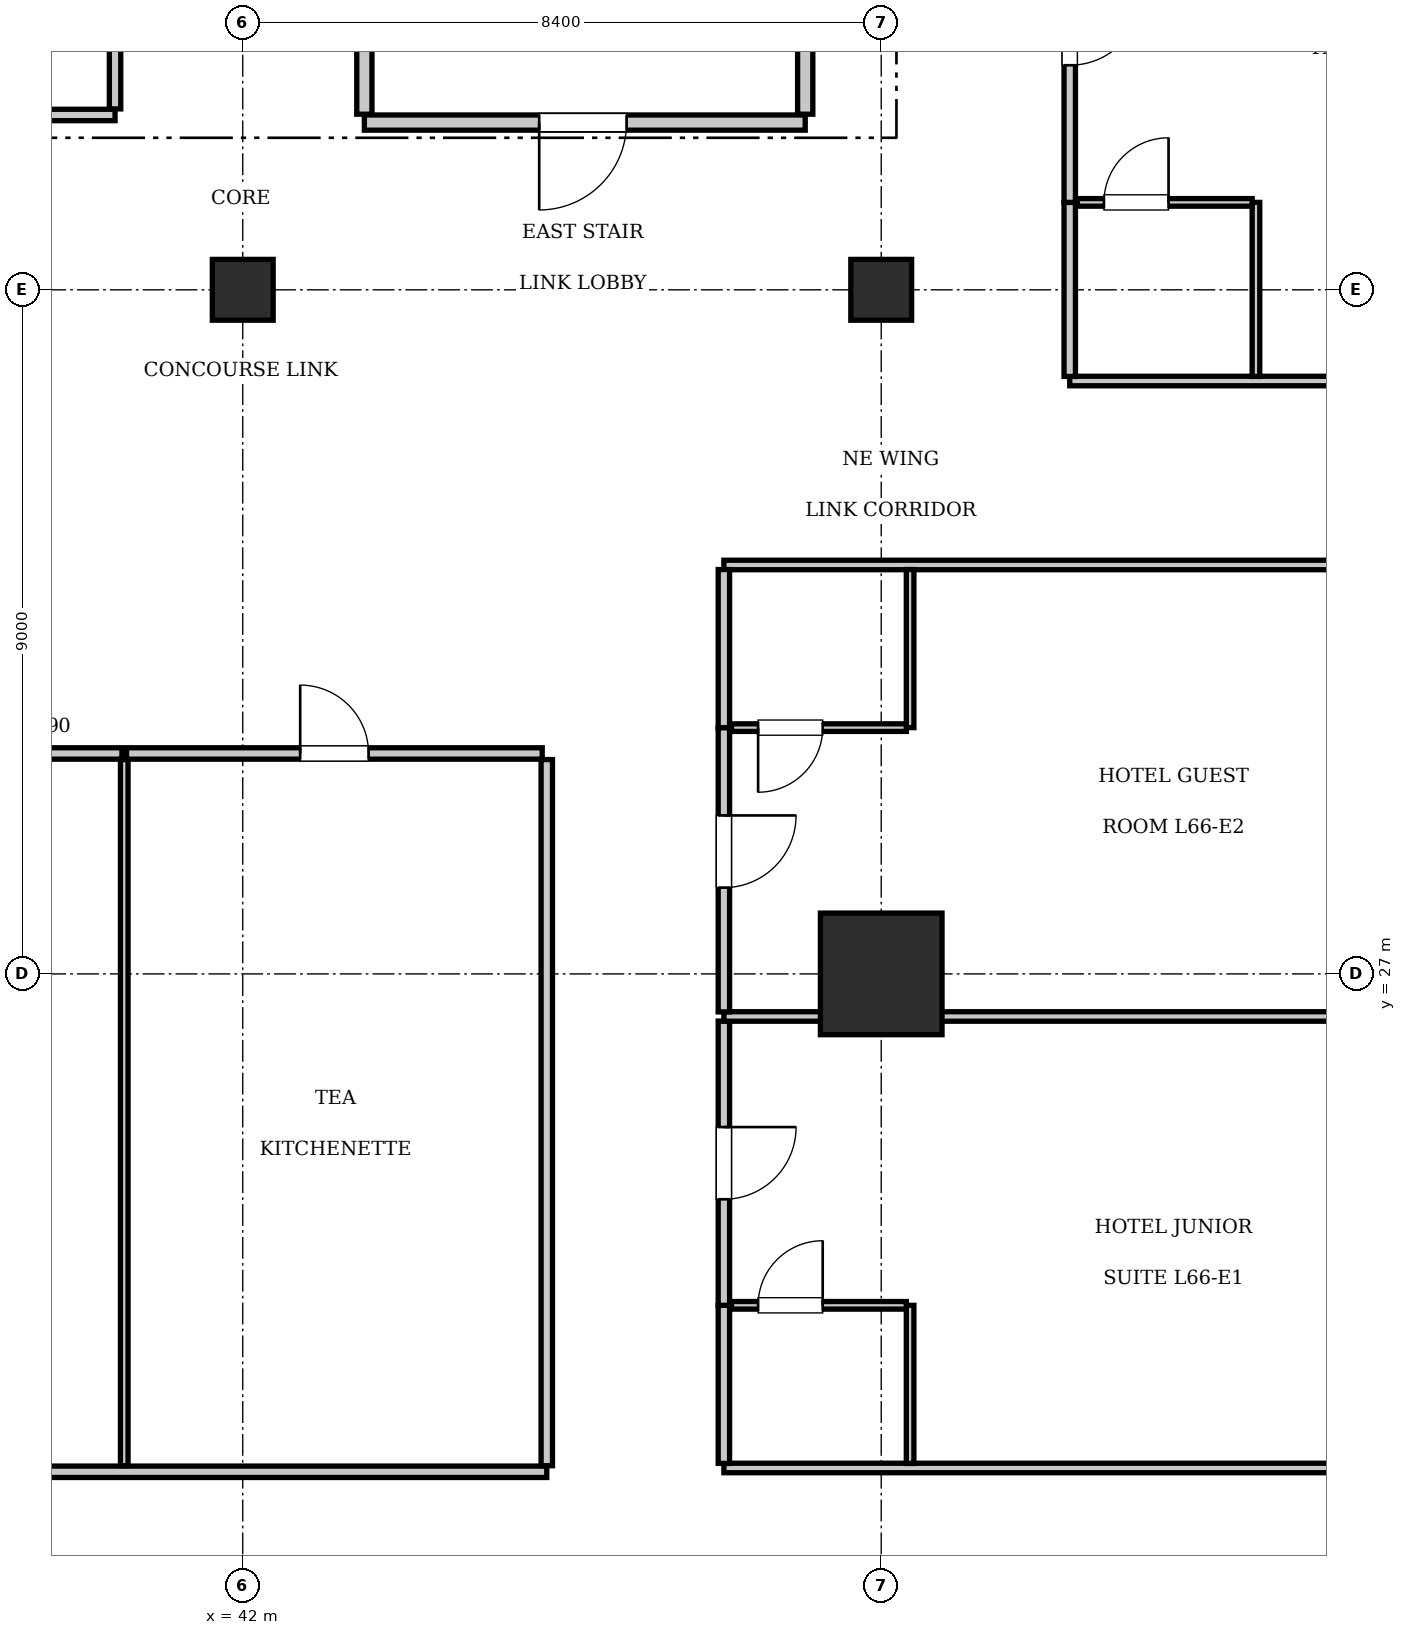
"""IFC4 building model, lengths in metres.
Left out: names, types, materials, properties, quantities, classifications, styles, units other than length and angle.
Written with IfcOpenShell. Run it as: python <this file> out.ifc"""

import sys

from ifc_helpers import new_model, si_unit, direction, frame, frame_2d, origin, origin_2d, place, context, subcontext, project, spatial, rectangle, extrude, element, fill, save


model = new_model("IFC4")
c1 = context("Model", 3, precision=1e-05, world=origin(), true_north=direction((0.0, 1.0)))
c2 = subcontext(c1, "Body", "Model", "MODEL_VIEW")
j1 = project(units=[si_unit("LENGTHUNIT", "METRE"), si_unit("PLANEANGLEUNIT", "RADIAN")], contexts=[c1])
p1 = place(None, origin())
s1 = spatial("IfcSite", under=j1, at=p1, CompositionType="ELEMENT")
p2 = place(p1, origin())
s2 = spatial("IfcBuilding", under=s1, at=p2, CompositionType="ELEMENT")
p3 = place(p2, frame((0.0, 0.0, 270.2)))
s3 = spatial("IfcBuildingStorey", under=s2, at=p3, CompositionType="ELEMENT", Elevation=270.2)
p4 = place(p3, frame((50.4, 27.0, 0.0), z_axis=(0.0, 0.0, 1.0), x_axis=(1.0, 0.0, 0.0)))
e1 = element("IfcColumn", 1, at=p4, inside=s3, PredefinedType="COLUMN", context=c2, shape_type="SweptSolid", body=[
    extrude(rectangle(XDim=1.6, YDim=1.6, at=origin_2d()), origin(), (0.0, 0.0, 1.0), 3.85),
])
for number, where, z_axis, x_axis in (
    (2, (42.0, 36.0, 0.0), (0.0, 0.0, 1.0), (1.0, 0.0, 0.0)),
    (3, (50.4, 36.0, 0.0), (0.0, 0.0, 1.0), (1.0, 0.0, 0.0)),
):
    element("IfcColumn", number, at=place(p3, frame(where, z_axis=z_axis, x_axis=x_axis)), inside=s3, PredefinedType="COLUMN", context=c2, shape_type="SweptSolid", body=[
        extrude(rectangle(XDim=0.8, YDim=0.8, at=origin_2d()), origin(), (0.0, 0.0, 1.0), 3.85),
    ])
p5 = place(p3, frame((43.6, 38.2, 0.0), z_axis=(0.0, 0.0, 1.0), x_axis=(1.0, 0.0, 0.0)))
e4 = element("IfcWall", 4, at=p5, inside=s3, PredefinedType="PARTITIONING", context=c2, shape_type="SweptSolid", body=[
    extrude(rectangle(XDim=5.8, YDim=0.2, at=frame_2d((2.9, 0.0))), origin(), (0.0, 0.0, 1.0), 3.61),
])
p6 = place(p5, frame((2.3, 0.0, 0.0)))
e5 = element("IfcOpeningElement", 5, at=p6, cuts=e4, PredefinedType="OPENING", context=c2, shape_type="SweptSolid", body=[
    extrude(rectangle(XDim=1.15, YDim=2.15, at=frame_2d((0.575, 1.075))), frame((0.0, 0.11, 0.0), z_axis=(0.0, -1.0, 0.0), x_axis=(1.0, 0.0, 0.0)), (0.0, 0.0, 1.0), 0.22),
])
for number, where, z_axis, x_axis in (
    (6, (43.6, 38.31, 0.0), (0.0, 0.0, 1.0), (0.0, 1.0, 0.0)),
    (7, (49.4, 38.31, 0.0), (0.0, 0.0, 1.0), (0.0, 1.0, 0.0)),
):
    element("IfcWall", number, at=place(p3, frame(where, z_axis=z_axis, x_axis=x_axis)), inside=s3, PredefinedType="PARTITIONING", context=c2, shape_type="SweptSolid", body=[
        extrude(rectangle(XDim=3.07, YDim=0.2, at=frame_2d((1.535, 0.0))), origin(), (0.0, 0.0, 1.0), 3.61),
    ])
p7 = place(p3, frame((34.4, 38.3, 0.0), z_axis=(0.0, 0.0, 1.0), x_axis=(1.0, 0.0, 0.0)))
e8 = element("IfcWall", 8, at=p7, inside=s3, PredefinedType="PARTITIONING", context=c2, shape_type="SweptSolid", body=[
    extrude(rectangle(XDim=5.92, YDim=0.15, at=frame_2d((2.96, 0.0))), origin(), (0.0, 0.0, 1.0), 3.61),
])
p8 = place(p7, frame((2.4, 0.0, 0.0)))
e9 = element("IfcOpeningElement", 9, at=p8, cuts=e8, PredefinedType="OPENING", context=c2, shape_type="SweptSolid", body=[
    extrude(rectangle(XDim=0.9, YDim=2.1, at=frame_2d((0.45, 1.05))), frame((0.0, 0.085, 0.0), z_axis=(0.0, -1.0, 0.0), x_axis=(1.0, 0.0, 0.0)), (0.0, 0.0, 1.0), 0.17),
])
p9 = place(p3, frame((40.32, 38.38, 0.0), z_axis=(0.0, 0.0, 1.0), x_axis=(0.0, 1.0, 0.0)))
e10 = element("IfcWall", 10, at=p9, inside=s3, PredefinedType="PARTITIONING", context=c2, shape_type="SweptSolid", body=[
    extrude(rectangle(XDim=2.84, YDim=0.15, at=frame_2d((1.42, 0.0))), origin(), (0.0, 0.0, 1.0), 3.61),
])
p10 = place(p3, frame((29.65, 20.45, 0.0), z_axis=(0.0, 0.0, 1.0), x_axis=(1.0, 0.0, 0.0)))
e11 = element("IfcWall", 11, at=p10, inside=s3, PredefinedType="PARTITIONING", context=c2, shape_type="SweptSolid", body=[
    extrude(rectangle(XDim=16.35, YDim=0.15, at=frame_2d((8.175, 0.0))), origin(), (0.0, 0.0, 1.0), 3.61),
])
p11 = place(p3, frame((46.0, 20.53, 0.0), z_axis=(0.0, 0.0, 1.0), x_axis=(0.0, 1.0, 0.0)))
e12 = element("IfcWall", 12, at=p11, inside=s3, PredefinedType="PARTITIONING", context=c2, shape_type="SweptSolid", body=[
    extrude(rectangle(XDim=9.29, YDim=0.15, at=frame_2d((4.645, 0.0))), origin(), (0.0, 0.0, 1.0), 3.61),
])
p12 = place(p3, frame((35.893, 29.9, 0.0), z_axis=(0.0, 0.0, 1.0), x_axis=(1.0, 0.0, 0.0)))
e13 = element("IfcWall", 13, at=p12, inside=s3, PredefinedType="PARTITIONING", context=c2, shape_type="SweptSolid", body=[
    extrude(rectangle(XDim=4.518, YDim=0.15, at=frame_2d((2.259, 0.0))), origin(), (0.0, 0.0, 1.0), 3.61),
])
p13 = place(p12, frame((1.809, 0.0, 0.0)))
e14 = element("IfcOpeningElement", 14, at=p13, cuts=e13, PredefinedType="OPENING", context=c2, shape_type="SweptSolid", body=[
    extrude(rectangle(XDim=0.9, YDim=2.1, at=frame_2d((0.45, 1.05))), frame((0.0, 0.085, 0.0), z_axis=(0.0, -1.0, 0.0), x_axis=(1.0, 0.0, 0.0)), (0.0, 0.0, 1.0), 0.17),
])
p14 = place(p3, frame((40.441, 20.53, 0.0), z_axis=(0.0, 0.0, 1.0), x_axis=(0.0, 1.0, 0.0)))
e15 = element("IfcWall", 15, at=p14, inside=s3, PredefinedType="PARTITIONING", context=c2, shape_type="SweptSolid", body=[
    extrude(rectangle(XDim=9.29, YDim=0.1, at=frame_2d((4.645, 0.0))), origin(), (0.0, 0.0, 1.0), 3.61),
])
p15 = place(p3, frame((40.471, 29.9, 0.0), z_axis=(0.0, 0.0, 1.0), x_axis=(1.0, 0.0, 0.0)))
e16 = element("IfcWall", 16, at=p15, inside=s3, PredefinedType="PARTITIONING", context=c2, shape_type="SweptSolid", body=[
    extrude(rectangle(XDim=5.469, YDim=0.15, at=frame_2d((2.734, 0.0))), origin(), (0.0, 0.0, 1.0), 3.61),
])
p16 = place(p15, frame((2.284, 0.0, 0.0)))
e17 = element("IfcOpeningElement", 17, at=p16, cuts=e16, PredefinedType="OPENING", context=c2, shape_type="SweptSolid", body=[
    extrude(rectangle(XDim=0.9, YDim=2.1, at=frame_2d((0.45, 1.05))), frame((0.0, 0.085, 0.0), z_axis=(0.0, -1.0, 0.0), x_axis=(1.0, 0.0, 0.0)), (0.0, 0.0, 1.0), 0.17),
])
for number, where, z_axis, x_axis in (
    (18, (48.33, 20.5, 0.0), (0.0, 0.0, 1.0), (1.0, 0.0, 0.0)),
    (19, (48.33, 32.38, 0.0), (0.0, 0.0, 1.0), (1.0, 0.0, 0.0)),
):
    element("IfcWall", number, at=place(p3, frame(where, z_axis=z_axis, x_axis=x_axis)), inside=s3, PredefinedType="PARTITIONING", context=c2, shape_type="SweptSolid", body=[
        extrude(rectangle(XDim=11.77, YDim=0.125, at=frame_2d((5.885, 0.0))), origin(), (0.0, 0.0, 1.0), 3.61),
    ])
p17 = place(p3, frame((48.33, 20.56, 0.0), z_axis=(0.0, 0.0, 1.0), x_axis=(0.0, 1.0, 0.0)))
e20 = element("IfcWall", 20, at=p17, inside=s3, PredefinedType="PARTITIONING", context=c2, shape_type="SweptSolid", body=[
    extrude(rectangle(XDim=2.08, YDim=0.15, at=frame_2d((1.04, 0.0))), origin(), (0.0, 0.0, 1.0), 3.61),
])
p18 = place(p3, frame((48.33, 22.64, 0.0), z_axis=(0.0, 0.0, 1.0), x_axis=(0.0, 1.0, 0.0)))
e21 = element("IfcWall", 21, at=p18, inside=s3, PredefinedType="PARTITIONING", context=c2, shape_type="SweptSolid", body=[
    extrude(rectangle(XDim=3.74, YDim=0.15, at=frame_2d((1.87, 0.0))), origin(), (0.0, 0.0, 1.0), 3.61),
])
p19 = place(p18, frame((1.395, 0.0, 0.0)))
e22 = element("IfcOpeningElement", 22, at=p19, cuts=e21, PredefinedType="OPENING", context=c2, shape_type="SweptSolid", body=[
    extrude(rectangle(XDim=0.95, YDim=2.15, at=frame_2d((0.475, 1.075))), frame((0.0, 0.085, 0.0), z_axis=(0.0, -1.0, 0.0), x_axis=(1.0, 0.0, 0.0)), (0.0, 0.0, 1.0), 0.17),
])
p20 = place(p3, frame((50.78, 20.56, 0.0), z_axis=(0.0, 0.0, 1.0), x_axis=(0.0, 1.0, 0.0)))
e23 = element("IfcWall", 23, at=p20, inside=s3, PredefinedType="PARTITIONING", context=c2, shape_type="SweptSolid", body=[
    extrude(rectangle(XDim=2.08, YDim=0.1, at=frame_2d((1.04, 0.0))), origin(), (0.0, 0.0, 1.0), 3.61),
])
p21 = place(p3, frame((48.43, 22.64, 0.0), z_axis=(0.0, 0.0, 1.0), x_axis=(1.0, 0.0, 0.0)))
e24 = element("IfcWall", 24, at=p21, inside=s3, PredefinedType="PARTITIONING", context=c2, shape_type="SweptSolid", body=[
    extrude(rectangle(XDim=2.3, YDim=0.1, at=frame_2d((1.15, 0.0))), origin(), (0.0, 0.0, 1.0), 3.61),
])
p22 = place(p21, frame((0.35, 0.0, 0.0)))
e25 = element("IfcOpeningElement", 25, at=p22, cuts=e24, PredefinedType="OPENING", context=c2, shape_type="SweptSolid", body=[
    extrude(rectangle(XDim=0.85, YDim=2.1, at=frame_2d((0.425, 1.05))), frame((0.0, 0.06, 0.0), z_axis=(0.0, -1.0, 0.0), x_axis=(1.0, 0.0, 0.0)), (0.0, 0.0, 1.0), 0.12),
])
p23 = place(p3, frame((48.33, 26.44, 0.0), z_axis=(0.0, 0.0, 1.0), x_axis=(1.0, 0.0, 0.0)))
e26 = element("IfcWall", 26, at=p23, inside=s3, PredefinedType="PARTITIONING", context=c2, shape_type="SweptSolid", body=[
    extrude(rectangle(XDim=11.77, YDim=0.125, at=frame_2d((5.885, 0.0))), origin(), (0.0, 0.0, 1.0), 3.61),
])
p24 = place(p3, frame((48.33, 26.5, 0.0), z_axis=(0.0, 0.0, 1.0), x_axis=(0.0, 1.0, 0.0)))
e27 = element("IfcWall", 27, at=p24, inside=s3, PredefinedType="PARTITIONING", context=c2, shape_type="SweptSolid", body=[
    extrude(rectangle(XDim=3.74, YDim=0.15, at=frame_2d((1.87, 0.0))), origin(), (0.0, 0.0, 1.0), 3.61),
])
p25 = place(p24, frame((1.635, 0.0, 0.0)))
e28 = element("IfcOpeningElement", 28, at=p25, cuts=e27, PredefinedType="OPENING", context=c2, shape_type="SweptSolid", body=[
    extrude(rectangle(XDim=0.95, YDim=2.15, at=frame_2d((0.475, 1.075))), frame((0.0, 0.085, 0.0), z_axis=(0.0, -1.0, 0.0), x_axis=(1.0, 0.0, 0.0)), (0.0, 0.0, 1.0), 0.17),
])
p26 = place(p3, frame((48.33, 30.24, 0.0), z_axis=(0.0, 0.0, 1.0), x_axis=(0.0, 1.0, 0.0)))
e29 = element("IfcWall", 29, at=p26, inside=s3, PredefinedType="PARTITIONING", context=c2, shape_type="SweptSolid", body=[
    extrude(rectangle(XDim=2.08, YDim=0.15, at=frame_2d((1.04, 0.0))), origin(), (0.0, 0.0, 1.0), 3.61),
])
p27 = place(p3, frame((50.78, 30.24, 0.0), z_axis=(0.0, 0.0, 1.0), x_axis=(0.0, 1.0, 0.0)))
e30 = element("IfcWall", 30, at=p27, inside=s3, PredefinedType="PARTITIONING", context=c2, shape_type="SweptSolid", body=[
    extrude(rectangle(XDim=2.08, YDim=0.1, at=frame_2d((1.04, 0.0))), origin(), (0.0, 0.0, 1.0), 3.61),
])
p28 = place(p3, frame((48.43, 30.24, 0.0), z_axis=(0.0, 0.0, 1.0), x_axis=(1.0, 0.0, 0.0)))
e31 = element("IfcWall", 31, at=p28, inside=s3, PredefinedType="PARTITIONING", context=c2, shape_type="SweptSolid", body=[
    extrude(rectangle(XDim=2.3, YDim=0.1, at=frame_2d((1.15, 0.0))), origin(), (0.0, 0.0, 1.0), 3.61),
])
p29 = place(p28, frame((0.35, 0.0, 0.0)))
e32 = element("IfcOpeningElement", 32, at=p29, cuts=e31, PredefinedType="OPENING", context=c2, shape_type="SweptSolid", body=[
    extrude(rectangle(XDim=0.85, YDim=2.1, at=frame_2d((0.425, 1.05))), frame((0.0, 0.06, 0.0), z_axis=(0.0, -1.0, 0.0), x_axis=(1.0, 0.0, 0.0)), (0.0, 0.0, 1.0), 0.12),
])
p30 = place(p3, frame((52.88, 34.8, 0.0), z_axis=(0.0, 0.0, 1.0), x_axis=(1.0, 0.0, 0.0)))
e33 = element("IfcWall", 33, at=p30, inside=s3, PredefinedType="PARTITIONING", context=c2, shape_type="SweptSolid", body=[
    extrude(rectangle(XDim=7.22, YDim=0.125, at=frame_2d((3.61, 0.0))), origin(), (0.0, 0.0, 1.0), 3.61),
])
p31 = place(p3, frame((52.88, 34.86, 0.0), z_axis=(0.0, 0.0, 1.0), x_axis=(0.0, 1.0, 0.0)))
e34 = element("IfcWall", 34, at=p31, inside=s3, PredefinedType="PARTITIONING", context=c2, shape_type="SweptSolid", body=[
    extrude(rectangle(XDim=2.29, YDim=0.15, at=frame_2d((1.145, 0.0))), origin(), (0.0, 0.0, 1.0), 3.61),
])
p32 = place(p3, frame((52.88, 37.15, 0.0), z_axis=(0.0, 0.0, 1.0), x_axis=(0.0, 1.0, 0.0)))
e35 = element("IfcWall", 35, at=p32, inside=s3, PredefinedType="PARTITIONING", context=c2, shape_type="SweptSolid", body=[
    extrude(rectangle(XDim=4.559, YDim=0.15, at=frame_2d((2.279, 0.0))), origin(), (0.0, 0.0, 1.0), 3.61),
])
p33 = place(p32, frame((1.804, 0.0, 0.0)))
e36 = element("IfcOpeningElement", 36, at=p33, cuts=e35, PredefinedType="OPENING", context=c2, shape_type="SweptSolid", body=[
    extrude(rectangle(XDim=0.95, YDim=2.15, at=frame_2d((0.475, 1.075))), frame((0.0, 0.085, 0.0), z_axis=(0.0, -1.0, 0.0), x_axis=(1.0, 0.0, 0.0)), (0.0, 0.0, 1.0), 0.17),
])
p34 = place(p3, frame((55.33, 34.86, 0.0), z_axis=(0.0, 0.0, 1.0), x_axis=(0.0, 1.0, 0.0)))
e37 = element("IfcWall", 37, at=p34, inside=s3, PredefinedType="PARTITIONING", context=c2, shape_type="SweptSolid", body=[
    extrude(rectangle(XDim=2.29, YDim=0.1, at=frame_2d((1.145, 0.0))), origin(), (0.0, 0.0, 1.0), 3.61),
])
p35 = place(p3, frame((52.98, 37.15, 0.0), z_axis=(0.0, 0.0, 1.0), x_axis=(1.0, 0.0, 0.0)))
e38 = element("IfcWall", 38, at=p35, inside=s3, PredefinedType="PARTITIONING", context=c2, shape_type="SweptSolid", body=[
    extrude(rectangle(XDim=2.3, YDim=0.1, at=frame_2d((1.15, 0.0))), origin(), (0.0, 0.0, 1.0), 3.61),
])
p36 = place(p35, frame((0.35, 0.0, 0.0)))
e39 = element("IfcOpeningElement", 39, at=p36, cuts=e38, PredefinedType="OPENING", context=c2, shape_type="SweptSolid", body=[
    extrude(rectangle(XDim=0.85, YDim=2.1, at=frame_2d((0.425, 1.05))), frame((0.0, 0.06, 0.0), z_axis=(0.0, -1.0, 0.0), x_axis=(1.0, 0.0, 0.0)), (0.0, 0.0, 1.0), 0.12),
])
p37 = place(p6, frame((1.15, 0.0, 0.0), z_axis=(0.0, 0.0, 1.0), x_axis=(-1.0, 0.0, 0.0)))
e40 = element("IfcDoor", 40, at=p37, inside=s3, OperationType="SINGLE_SWING_RIGHT", PredefinedType="DOOR", context=c2, shape_type="SweptSolid", body=[
    extrude(rectangle(XDim=1.15, YDim=2.15, at=frame_2d((0.575, 1.075))), frame((0.0, 0.025, 0.0), z_axis=(0.0, -1.0, 0.0), x_axis=(1.0, 0.0, 0.0)), (0.0, 0.0, 1.0), 0.05),
])
fill(e5, e40)
p38 = place(p16, origin())
e41 = element("IfcDoor", 41, at=p38, inside=s3, OperationType="SINGLE_SWING_LEFT", PredefinedType="DOOR", context=c2, shape_type="SweptSolid", body=[
    extrude(rectangle(XDim=0.9, YDim=2.1, at=frame_2d((0.45, 1.05))), frame((0.0, 0.025, 0.0), z_axis=(0.0, -1.0, 0.0), x_axis=(1.0, 0.0, 0.0)), (0.0, 0.0, 1.0), 0.05),
])
fill(e17, e41)
p39 = place(p22, origin())
e42 = element("IfcDoor", 42, at=p39, inside=s3, OperationType="SINGLE_SWING_RIGHT", PredefinedType="DOOR", context=c2, shape_type="SweptSolid", body=[
    extrude(rectangle(XDim=0.85, YDim=2.1, at=frame_2d((0.425, 1.05))), frame((0.0, 0.025, 0.0), z_axis=(0.0, -1.0, 0.0), x_axis=(1.0, 0.0, 0.0)), (0.0, 0.0, 1.0), 0.05),
])
fill(e25, e42)
p40 = place(p19, frame((0.95, 0.0, 0.0), z_axis=(0.0, 0.0, 1.0), x_axis=(-1.0, 0.0, 0.0)))
e43 = element("IfcDoor", 43, at=p40, inside=s3, OperationType="SINGLE_SWING_LEFT", PredefinedType="DOOR", context=c2, shape_type="SweptSolid", body=[
    extrude(rectangle(XDim=0.95, YDim=2.15, at=frame_2d((0.475, 1.075))), frame((0.0, 0.025, 0.0), z_axis=(0.0, -1.0, 0.0), x_axis=(1.0, 0.0, 0.0)), (0.0, 0.0, 1.0), 0.05),
])
fill(e22, e43)
p41 = place(p29, frame((0.85, 0.0, 0.0), z_axis=(0.0, 0.0, 1.0), x_axis=(-1.0, 0.0, 0.0)))
e44 = element("IfcDoor", 44, at=p41, inside=s3, OperationType="SINGLE_SWING_RIGHT", PredefinedType="DOOR", context=c2, shape_type="SweptSolid", body=[
    extrude(rectangle(XDim=0.85, YDim=2.1, at=frame_2d((0.425, 1.05))), frame((0.0, 0.025, 0.0), z_axis=(0.0, -1.0, 0.0), x_axis=(1.0, 0.0, 0.0)), (0.0, 0.0, 1.0), 0.05),
])
fill(e32, e44)
p42 = place(p25, frame((0.95, 0.0, 0.0), z_axis=(0.0, 0.0, 1.0), x_axis=(-1.0, 0.0, 0.0)))
e45 = element("IfcDoor", 45, at=p42, inside=s3, OperationType="SINGLE_SWING_LEFT", PredefinedType="DOOR", context=c2, shape_type="SweptSolid", body=[
    extrude(rectangle(XDim=0.95, YDim=2.15, at=frame_2d((0.475, 1.075))), frame((0.0, 0.025, 0.0), z_axis=(0.0, -1.0, 0.0), x_axis=(1.0, 0.0, 0.0)), (0.0, 0.0, 1.0), 0.05),
])
fill(e28, e45)
p43 = place(p36, origin())
e46 = element("IfcDoor", 46, at=p43, inside=s3, OperationType="SINGLE_SWING_RIGHT", PredefinedType="DOOR", context=c2, shape_type="SweptSolid", body=[
    extrude(rectangle(XDim=0.85, YDim=2.1, at=frame_2d((0.425, 1.05))), frame((0.0, 0.025, 0.0), z_axis=(0.0, -1.0, 0.0), x_axis=(1.0, 0.0, 0.0)), (0.0, 0.0, 1.0), 0.05),
])
fill(e39, e46)
p44 = place(p33, frame((0.95, 0.0, 0.0), z_axis=(0.0, 0.0, 1.0), x_axis=(-1.0, 0.0, 0.0)))
e47 = element("IfcDoor", 47, at=p44, inside=s3, OperationType="SINGLE_SWING_LEFT", PredefinedType="DOOR", context=c2, shape_type="SweptSolid", body=[
    extrude(rectangle(XDim=0.95, YDim=2.15, at=frame_2d((0.475, 1.075))), frame((0.0, 0.025, 0.0), z_axis=(0.0, -1.0, 0.0), x_axis=(1.0, 0.0, 0.0)), (0.0, 0.0, 1.0), 0.05),
])
fill(e36, e47)
save(model, sys.argv[1])
